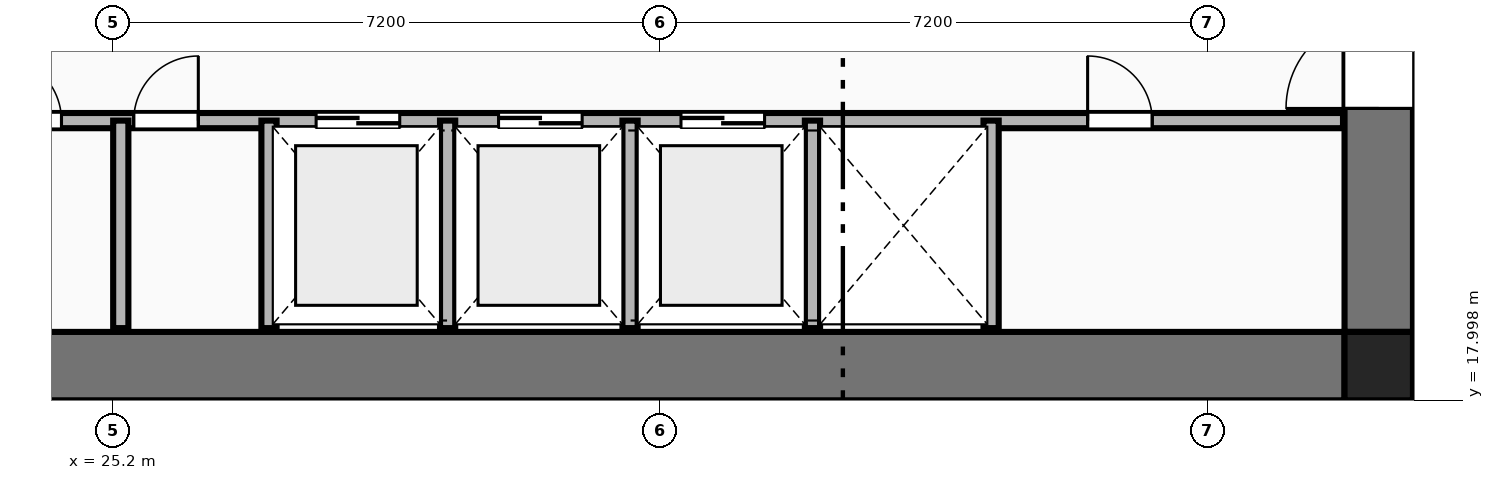
"""IFC4 building model, lengths in metres.
Left out: names, types, materials, properties, quantities, classifications, styles, units other than length and angle.
Written with IfcOpenShell. Run it as: python <this file> out.ifc"""

import sys

from ifc_helpers import new_model, si_unit, direction, frame, frame_2d, origin, origin_2d, place, context, subcontext, project, spatial, rectangle, extrude, element, fill, save


model = new_model("IFC4")
c1 = context("Model", 3, precision=1e-05, world=origin(), true_north=direction((0.0, 1.0)))
c2 = subcontext(c1, "Body", "Model", "MODEL_VIEW")
j1 = project(units=[si_unit("LENGTHUNIT", "METRE"), si_unit("PLANEANGLEUNIT", "RADIAN")], contexts=[c1])
p1 = place(None, origin())
s1 = spatial("IfcSite", under=j1, at=p1, CompositionType="ELEMENT")
p2 = place(p1, origin())
s2 = spatial("IfcBuilding", under=s1, at=p2, CompositionType="ELEMENT")
p3 = place(p2, frame((0.0, 0.0, 63.95)))
s3 = spatial("IfcBuildingStorey", under=s2, at=p3, CompositionType="ELEMENT", Elevation=63.95)
p4 = place(p3, frame((41.85, 18.45, 0.0), z_axis=(0.0, 0.0, 1.0), x_axis=(1.0, 0.0, 0.0)))
e1 = element("IfcColumn", 1, at=p4, inside=s3, PredefinedType="COLUMN", context=c2, shape_type="SweptSolid", body=[
    extrude(rectangle(XDim=0.9, YDim=0.9, at=origin_2d()), origin(), (0.0, 0.0, 1.0), 3.55),
])
p5 = place(p3, frame((23.4, 18.45, 0.0), z_axis=(0.0, 0.0, 1.0), x_axis=(1.0, 0.0, 0.0)))
e2 = element("IfcWall", 2, at=p5, inside=s3, PredefinedType="SHEAR", context=c2, shape_type="SweptSolid", body=[
    extrude(rectangle(XDim=18.0, YDim=0.9, at=frame_2d((9.0, 0.0))), origin(), (0.0, 0.0, 1.0), 3.33),
])
p6 = place(p3, frame((41.85, 18.9, 0.0), z_axis=(0.0, 0.0, 1.0), x_axis=(0.0, 1.0, 0.0)))
e3 = element("IfcWall", 3, at=p6, inside=s3, PredefinedType="SHEAR", context=c2, shape_type="SweptSolid", body=[
    extrude(rectangle(XDim=14.0, YDim=0.9, at=frame_2d((7.0, 0.0))), origin(), (0.0, 0.0, 1.0), 3.33),
])
p7 = place(p6, frame((2.94, 0.0, 0.0)))
e4 = element("IfcOpeningElement", 4, at=p7, cuts=e3, PredefinedType="OPENING", context=c2, shape_type="SweptSolid", body=[
    extrude(rectangle(XDim=1.22, YDim=2.25, at=frame_2d((0.61, 1.125))), frame((0.0, 0.46, 0.0), z_axis=(0.0, -1.0, 0.0), x_axis=(1.0, 0.0, 0.0)), (0.0, 0.0, 1.0), 0.92),
])
p8 = place(p3, frame((23.42, 21.68, 0.0), z_axis=(0.0, 0.0, 1.0), x_axis=(1.0, 0.0, 0.0)))
e5 = element("IfcWall", 5, at=p8, inside=s3, PredefinedType="PLUMBINGWALL", context=c2, shape_type="SweptSolid", body=[
    extrude(rectangle(XDim=17.96, YDim=0.2, at=frame_2d((8.98, 0.0))), origin(), (0.0, 0.0, 1.0), 3.33),
])
p9 = place(p8, frame((4.45, 0.0, 0.0)))
e6 = element("IfcOpeningElement", 6, at=p9, cuts=e5, PredefinedType="OPENING", context=c2, shape_type="SweptSolid", body=[
    extrude(rectangle(XDim=1.1, YDim=2.2, at=frame_2d((0.55, 1.1))), frame((0.0, 0.11, 0.0), z_axis=(0.0, -1.0, 0.0), x_axis=(1.0, 0.0, 0.0)), (0.0, 0.0, 1.0), 0.22),
])
p10 = place(p8, frame((6.85, 0.0, 0.0)))
e7 = element("IfcOpeningElement", 7, at=p10, cuts=e5, PredefinedType="OPENING", context=c2, shape_type="SweptSolid", body=[
    extrude(rectangle(XDim=1.1, YDim=2.2, at=frame_2d((0.55, 1.1))), frame((0.0, 0.11, 0.0), z_axis=(0.0, -1.0, 0.0), x_axis=(1.0, 0.0, 0.0)), (0.0, 0.0, 1.0), 0.22),
])
p11 = place(p8, frame((9.25, 0.0, 0.0)))
e8 = element("IfcOpeningElement", 8, at=p11, cuts=e5, PredefinedType="OPENING", context=c2, shape_type="SweptSolid", body=[
    extrude(rectangle(XDim=1.1, YDim=2.2, at=frame_2d((0.55, 1.1))), frame((0.0, 0.11, 0.0), z_axis=(0.0, -1.0, 0.0), x_axis=(1.0, 0.0, 0.0)), (0.0, 0.0, 1.0), 0.22),
])
p12 = place(p8, frame((0.25, 0.0, 0.0)))
e9 = element("IfcOpeningElement", 9, at=p12, cuts=e5, PredefinedType="OPENING", context=c2, shape_type="SweptSolid", body=[
    extrude(rectangle(XDim=0.85, YDim=2.05, at=frame_2d((0.425, 1.025))), frame((0.0, 0.11, 0.0), z_axis=(0.0, -1.0, 0.0), x_axis=(1.0, 0.0, 0.0)), (0.0, 0.0, 1.0), 0.22),
])
p13 = place(p8, frame((2.05, 0.0, 0.0)))
e10 = element("IfcOpeningElement", 10, at=p13, cuts=e5, PredefinedType="OPENING", context=c2, shape_type="SweptSolid", body=[
    extrude(rectangle(XDim=0.85, YDim=2.05, at=frame_2d((0.425, 1.025))), frame((0.0, 0.11, 0.0), z_axis=(0.0, -1.0, 0.0), x_axis=(1.0, 0.0, 0.0)), (0.0, 0.0, 1.0), 0.22),
])
p14 = place(p8, frame((14.6, 0.0, 0.0)))
e11 = element("IfcOpeningElement", 11, at=p14, cuts=e5, PredefinedType="OPENING", context=c2, shape_type="SweptSolid", body=[
    extrude(rectangle(XDim=0.85, YDim=2.05, at=frame_2d((0.425, 1.025))), frame((0.0, 0.11, 0.0), z_axis=(0.0, -1.0, 0.0), x_axis=(1.0, 0.0, 0.0)), (0.0, 0.0, 1.0), 0.22),
])
for number, where, z_axis, x_axis in (
    (12, (27.25, 18.95, 0.0), (0.0, 0.0, 1.0), (0.0, 1.0, 0.0)),
    (13, (29.6, 18.95, 0.0), (0.0, 0.0, 1.0), (0.0, 1.0, 0.0)),
    (14, (32.0, 18.95, 0.0), (0.0, 0.0, 1.0), (0.0, 1.0, 0.0)),
    (15, (34.4, 18.95, 0.0), (0.0, 0.0, 1.0), (0.0, 1.0, 0.0)),
    (16, (36.75, 18.95, 0.0), (0.0, 0.0, 1.0), (0.0, 1.0, 0.0)),
    (17, (25.3, 18.95, 0.0), (0.0, 0.0, 1.0), (0.0, 1.0, 0.0)),
):
    element("IfcWall", number, at=place(p3, frame(where, z_axis=z_axis, x_axis=x_axis)), inside=s3, PredefinedType="PLUMBINGWALL", context=c2, shape_type="SweptSolid", body=[
        extrude(rectangle(XDim=2.73, YDim=0.2, at=frame_2d((1.365, 0.0))), origin(), (0.0, 0.0, 1.0), 3.33),
    ])
p15 = place(p7, origin())
e18 = element("IfcDoor", 18, at=p15, inside=s3, OperationType="SINGLE_SWING_LEFT", PredefinedType="DOOR", context=c2, shape_type="SweptSolid", body=[
    extrude(rectangle(XDim=1.22, YDim=2.25, at=frame_2d((0.61, 1.125))), frame((0.0, 0.025, 0.0), z_axis=(0.0, -1.0, 0.0), x_axis=(1.0, 0.0, 0.0)), (0.0, 0.0, 1.0), 0.05),
])
fill(e4, e18)
p16 = place(p9, origin())
e19 = element("IfcDoor", 19, at=p16, inside=s3, OperationType="DOUBLE_DOOR_SLIDING", PredefinedType="DOOR", context=c2, shape_type="SweptSolid", body=[
    extrude(rectangle(XDim=1.1, YDim=2.2, at=frame_2d((0.55, 1.1))), frame((0.0, 0.025, 0.0), z_axis=(0.0, -1.0, 0.0), x_axis=(1.0, 0.0, 0.0)), (0.0, 0.0, 1.0), 0.05),
])
fill(e6, e19)
p17 = place(p10, origin())
e20 = element("IfcDoor", 20, at=p17, inside=s3, OperationType="DOUBLE_DOOR_SLIDING", PredefinedType="DOOR", context=c2, shape_type="SweptSolid", body=[
    extrude(rectangle(XDim=1.1, YDim=2.2, at=frame_2d((0.55, 1.1))), frame((0.0, 0.025, 0.0), z_axis=(0.0, -1.0, 0.0), x_axis=(1.0, 0.0, 0.0)), (0.0, 0.0, 1.0), 0.05),
])
fill(e7, e20)
p18 = place(p11, origin())
e21 = element("IfcDoor", 21, at=p18, inside=s3, OperationType="DOUBLE_DOOR_SLIDING", PredefinedType="DOOR", context=c2, shape_type="SweptSolid", body=[
    extrude(rectangle(XDim=1.1, YDim=2.2, at=frame_2d((0.55, 1.1))), frame((0.0, 0.025, 0.0), z_axis=(0.0, -1.0, 0.0), x_axis=(1.0, 0.0, 0.0)), (0.0, 0.0, 1.0), 0.05),
])
fill(e8, e21)
p19 = place(p12, origin())
e22 = element("IfcDoor", 22, at=p19, inside=s3, OperationType="SINGLE_SWING_LEFT", PredefinedType="DOOR", context=c2, shape_type="SweptSolid", body=[
    extrude(rectangle(XDim=0.85, YDim=2.05, at=frame_2d((0.425, 1.025))), frame((0.0, 0.025, 0.0), z_axis=(0.0, -1.0, 0.0), x_axis=(1.0, 0.0, 0.0)), (0.0, 0.0, 1.0), 0.05),
])
fill(e9, e22)
p20 = place(p13, origin())
e23 = element("IfcDoor", 23, at=p20, inside=s3, OperationType="SINGLE_SWING_RIGHT", PredefinedType="DOOR", context=c2, shape_type="SweptSolid", body=[
    extrude(rectangle(XDim=0.85, YDim=2.05, at=frame_2d((0.425, 1.025))), frame((0.0, 0.025, 0.0), z_axis=(0.0, -1.0, 0.0), x_axis=(1.0, 0.0, 0.0)), (0.0, 0.0, 1.0), 0.05),
])
fill(e10, e23)
p21 = place(p14, origin())
e24 = element("IfcDoor", 24, at=p21, inside=s3, OperationType="SINGLE_SWING_LEFT", PredefinedType="DOOR", context=c2, shape_type="SweptSolid", body=[
    extrude(rectangle(XDim=0.85, YDim=2.05, at=frame_2d((0.425, 1.025))), frame((0.0, 0.025, 0.0), z_axis=(0.0, -1.0, 0.0), x_axis=(1.0, 0.0, 0.0)), (0.0, 0.0, 1.0), 0.05),
])
fill(e11, e24)
save(model, sys.argv[1])
